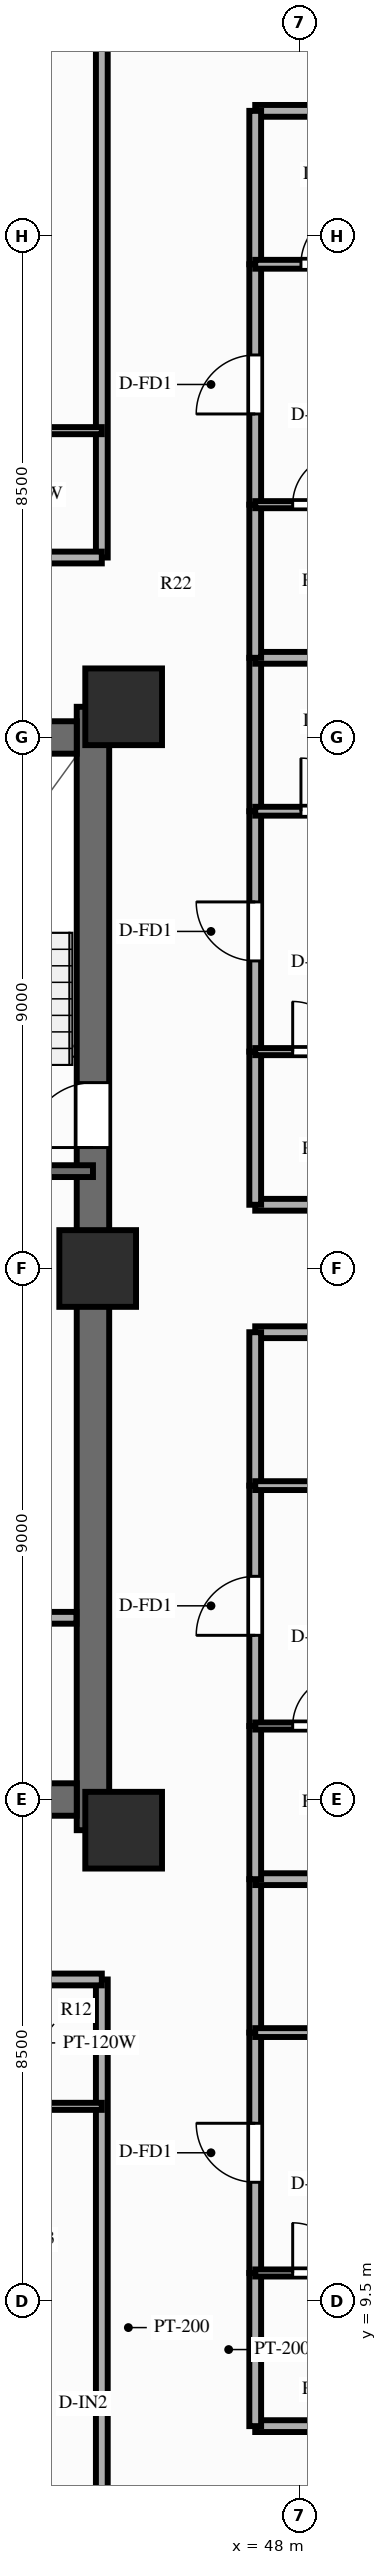
"""IFC4 building model, lengths in metres.
Left out: names, types, materials, properties, quantities, classifications, styles, units other than length and angle.
Written with IfcOpenShell. Run it as: python <this file> out.ifc"""

import sys

from ifc_helpers import new_model, si_unit, direction, frame, frame_2d, origin, origin_2d, place, context, subcontext, project, spatial, rectangle, extrude, source, transform, mapped, element, fill, save


model = new_model("IFC4")
c1 = context("Model", 3, precision=1e-05, world=origin(), true_north=direction((0.0, 1.0)))
c2 = subcontext(c1, "Body", "Model", "MODEL_VIEW")
j1 = project(units=[si_unit("LENGTHUNIT", "METRE"), si_unit("PLANEANGLEUNIT", "RADIAN")], contexts=[c1])
p1 = place(None, origin())
s1 = spatial("IfcSite", under=j1, at=p1, CompositionType="ELEMENT")
p2 = place(p1, origin())
s2 = spatial("IfcBuilding", under=s1, at=p2, CompositionType="ELEMENT")
p3 = place(p2, frame((0.0, 0.0, 107.85)))
s3 = spatial("IfcBuildingStorey", under=s2, at=p3, CompositionType="ELEMENT", Elevation=107.85)
p4 = place(p3, frame((44.5, 17.48, 0.0), z_axis=(0.0, 0.0, 1.0), x_axis=(0.0, 1.0, 0.0)))
e1 = element("IfcWall", 1, at=p4, inside=s3, PredefinedType="SHEAR", context=c2, shape_type="SweptSolid", body=[
    extrude(rectangle(XDim=19.04, YDim=0.55, at=frame_2d((9.52, 0.0))), origin(), (0.0, 0.0, 1.0), 3.0),
])
p5 = place(p4, frame((12.67, 0.0, 0.0), z_axis=(0.0, 0.0, 1.0), x_axis=(-1.0, 0.0, 0.0)))
e2 = element("IfcOpeningElement", 2, at=p5, cuts=e1, PredefinedType="OPENING", context=c2, shape_type="SweptSolid", body=[
    extrude(rectangle(XDim=1.1, YDim=2.15, at=frame_2d((0.55, 1.075))), frame((0.0, 0.287, 0.0), z_axis=(0.0, -1.0, 0.0), x_axis=(1.0, 0.0, 0.0)), (0.0, 0.0, 1.0), 0.574),
])
p6 = place(p3, frame((31.775, 18.0, 0.0), z_axis=(0.0, 0.0, 1.0), x_axis=(1.0, 0.0, 0.0)))
e3 = element("IfcWall", 3, at=p6, inside=s3, PredefinedType="SHEAR", context=c2, shape_type="SweptSolid", body=[
    extrude(rectangle(XDim=12.45, YDim=0.55, at=frame_2d((6.225, 0.0))), origin(), (0.0, 0.0, 1.0), 3.0),
])
p7 = place(p3, frame((31.775, 36.0, 0.0), z_axis=(0.0, 0.0, 1.0), x_axis=(1.0, 0.0, 0.0)))
e4 = element("IfcWall", 4, at=p7, inside=s3, PredefinedType="SHEAR", context=c2, shape_type="SweptSolid", body=[
    extrude(rectangle(XDim=12.45, YDim=0.55, at=frame_2d((6.225, 0.0))), origin(), (0.0, 0.0, 1.0), 3.0),
])
p8 = place(p7, frame((5.175, 0.0, 0.0), z_axis=(0.0, 0.0, 1.0), x_axis=(-1.0, 0.0, 0.0)))
e5 = element("IfcOpeningElement", 5, at=p8, cuts=e4, PredefinedType="OPENING", context=c2, shape_type="SweptSolid", body=[
    extrude(rectangle(XDim=1.4, YDim=2.15, at=frame_2d((0.7, 1.075))), frame((0.0, 0.287, 0.0), z_axis=(0.0, -1.0, 0.0), x_axis=(1.0, 0.0, 0.0)), (0.0, 0.0, 1.0), 0.574),
])
m1 = source(origin(), c2, "Body", "SweptSolid", [
    extrude(rectangle(XDim=1.3, YDim=1.3, at=origin_2d()), origin(), (0.0, 0.0, 1.0), 3.0),
])
for number, where, z_axis, x_axis in (
    (6, (45.02, 17.48, 0.0), (0.0, 0.0, 1.0), (1.0, 0.0, 0.0)),
    (7, (45.02, 36.52, 0.0), (0.0, 0.0, 1.0), (1.0, 0.0, 0.0)),
    (8, (44.58, 27.0, 0.0), (0.0, 0.0, 1.0), (1.0, 0.0, 0.0)),
):
    element("IfcColumn", number, at=place(p3, frame(where, z_axis=z_axis, x_axis=x_axis)), inside=s3, PredefinedType="COLUMN", context=c2, shape_type="MappedRepresentation", body=[
        mapped(m1, transform((0.0, 0.0, 0.0), scale=1.0)),
    ])
p9 = place(p3, frame((42.88, 21.08, 0.0), z_axis=(0.0, 0.0, 1.0), x_axis=(1.0, 0.0, 0.0)))
e9 = element("IfcWall", 9, at=p9, inside=s3, PredefinedType="PARTITIONING", context=c2, shape_type="SweptSolid", body=[
    extrude(rectangle(XDim=1.34, YDim=0.2, at=frame_2d((0.67, 0.0))), origin(), (0.0, 0.0, 1.0), 2.79),
])
p10 = place(p3, frame((40.57, 28.65, 0.0), z_axis=(0.0, 0.0, 1.0), x_axis=(1.0, 0.0, 0.0)))
e10 = element("IfcWall", 10, at=p10, inside=s3, PredefinedType="SOLIDWALL", context=c2, shape_type="SweptSolid", body=[
    extrude(rectangle(XDim=3.93, YDim=0.2, at=frame_2d((1.965, 0.0))), origin(), (0.0, 0.0, 1.0), 2.79),
])
p11 = place(p3, frame((44.65, 14.95, 0.0), z_axis=(0.0, 0.0, 1.0), x_axis=(0.0, -1.0, 0.0)))
e11 = element("IfcWall", 11, at=p11, inside=s3, PredefinedType="PARTITIONING", context=c2, shape_type="SweptSolid", body=[
    extrude(rectangle(XDim=11.8, YDim=0.2, at=frame_2d((5.9, 0.0))), origin(), (0.0, 0.0, 1.0), 2.34),
])
p12 = place(p3, frame((42.5, 14.95, 0.0), z_axis=(0.0, 0.0, 1.0), x_axis=(1.0, 0.0, 0.0)))
e12 = element("IfcWall", 12, at=p12, inside=s3, PredefinedType="PARTITIONING", context=c2, shape_type="SweptSolid", body=[
    extrude(rectangle(XDim=2.15, YDim=0.2, at=frame_2d((1.075, 0.0))), origin(), (0.0, 0.0, 1.0), 2.79),
])
p13 = place(p3, frame((42.5, 12.8, 0.0), z_axis=(0.0, 0.0, 1.0), x_axis=(1.0, 0.0, 0.0)))
e13 = element("IfcWall", 13, at=p13, inside=s3, PredefinedType="PARTITIONING", context=c2, shape_type="SweptSolid", body=[
    extrude(rectangle(XDim=2.15, YDim=0.12, at=frame_2d((1.075, 0.0))), origin(), (0.0, 0.0, 1.0), 2.79),
])
p14 = place(p3, frame((44.65, 39.05, 0.0), z_axis=(0.0, 0.0, 1.0), x_axis=(0.0, 1.0, 0.0)))
e14 = element("IfcWall", 14, at=p14, inside=s3, PredefinedType="PARTITIONING", context=c2, shape_type="SweptSolid", body=[
    extrude(rectangle(XDim=11.8, YDim=0.2, at=frame_2d((5.9, 0.0))), origin(), (0.0, 0.0, 1.0), 2.34),
])
p15 = place(p3, frame((42.085, 39.05, 0.0), z_axis=(0.0, 0.0, 1.0), x_axis=(1.0, 0.0, 0.0)))
e15 = element("IfcWall", 15, at=p15, inside=s3, PredefinedType="PARTITIONING", context=c2, shape_type="SweptSolid", body=[
    extrude(rectangle(XDim=2.564, YDim=0.2, at=frame_2d((1.282, 0.0))), origin(), (0.0, 0.0, 1.0), 2.79),
])
p16 = place(p3, frame((42.085, 41.2, 0.0), z_axis=(0.0, 0.0, 1.0), x_axis=(1.0, 0.0, 0.0)))
e16 = element("IfcWall", 16, at=p16, inside=s3, PredefinedType="PARTITIONING", context=c2, shape_type="SweptSolid", body=[
    extrude(rectangle(XDim=2.564, YDim=0.12, at=frame_2d((1.282, 0.0))), origin(), (0.0, 0.0, 1.0), 2.79),
])
for number, where, z_axis, x_axis in (
    (17, (47.25, 7.38, 0.0), (0.0, 0.0, 1.0), (1.0, 0.0, 0.0)),
    (18, (47.25, 25.92, 0.0), (0.0, 0.0, 1.0), (1.0, 0.0, 0.0)),
):
    element("IfcWall", number, at=place(p3, frame(where, z_axis=z_axis, x_axis=x_axis)), inside=s3, PredefinedType="PARTITIONING", context=c2, shape_type="SweptSolid", body=[
        extrude(rectangle(XDim=16.6, YDim=0.2, at=frame_2d((8.3, 0.0))), origin(), (0.0, 0.0, 1.0), 2.79),
    ])
p17 = place(p3, frame((47.25, 7.38, 0.0), z_axis=(0.0, 0.0, 1.0), x_axis=(0.0, 1.0, 0.0)))
e19 = element("IfcWall", 19, at=p17, inside=s3, PredefinedType="PARTITIONING", context=c2, shape_type="SweptSolid", body=[
    extrude(rectangle(XDim=2.596, YDim=0.2, at=frame_2d((1.298, 0.0))), origin(), (0.0, 0.0, 1.0), 2.79),
])
p18 = place(p3, frame((47.25, 9.976, 0.0), z_axis=(0.0, 0.0, 1.0), x_axis=(0.0, 1.0, 0.0)))
e20 = element("IfcWall", 20, at=p18, inside=s3, PredefinedType="PARTITIONING", context=c2, shape_type="SweptSolid", body=[
    extrude(rectangle(XDim=4.074, YDim=0.2, at=frame_2d((2.037, 0.0))), origin(), (0.0, 0.0, 1.0), 2.79),
])
p19 = place(p18, frame((1.537, 0.0, 0.0)))
e21 = element("IfcOpeningElement", 21, at=p19, cuts=e20, PredefinedType="OPENING", context=c2, shape_type="SweptSolid", body=[
    extrude(rectangle(XDim=1.0, YDim=2.15, at=frame_2d((0.5, 1.075))), frame((0.0, 0.112, 0.0), z_axis=(0.0, -1.0, 0.0), x_axis=(1.0, 0.0, 0.0)), (0.0, 0.0, 1.0), 0.224),
])
p20 = place(p3, frame((47.25, 14.05, 0.0), z_axis=(0.0, 0.0, 1.0), x_axis=(0.0, 1.0, 0.0)))
e22 = element("IfcWall", 22, at=p20, inside=s3, PredefinedType="PARTITIONING", context=c2, shape_type="SweptSolid", body=[
    extrude(rectangle(XDim=2.6, YDim=0.2, at=frame_2d((1.3, 0.0))), origin(), (0.0, 0.0, 1.0), 2.79),
])
p21 = place(p3, frame((47.25, 9.976, 0.0), z_axis=(0.0, 0.0, 1.0), x_axis=(1.0, 0.0, 0.0)))
e23 = element("IfcWall", 23, at=p21, inside=s3, PredefinedType="PARTITIONING", context=c2, shape_type="SweptSolid", body=[
    extrude(rectangle(XDim=2.12, YDim=0.12, at=frame_2d((1.06, 0.0))), origin(), (0.0, 0.0, 1.0), 2.79),
])
p22 = place(p21, frame((0.635, 0.0, 0.0)))
e24 = element("IfcOpeningElement", 24, at=p22, cuts=e23, PredefinedType="OPENING", context=c2, shape_type="SweptSolid", body=[
    extrude(rectangle(XDim=0.85, YDim=2.05, at=frame_2d((0.425, 1.025))), frame((0.0, 0.072, 0.0), z_axis=(0.0, -1.0, 0.0), x_axis=(1.0, 0.0, 0.0)), (0.0, 0.0, 1.0), 0.144),
])
p23 = place(p3, frame((47.25, 14.05, 0.0), z_axis=(0.0, 0.0, 1.0), x_axis=(1.0, 0.0, 0.0)))
e25 = element("IfcWall", 25, at=p23, inside=s3, PredefinedType="PARTITIONING", context=c2, shape_type="SweptSolid", body=[
    extrude(rectangle(XDim=2.93, YDim=0.15, at=frame_2d((1.465, 0.0))), origin(), (0.0, 0.0, 1.0), 2.79),
])
p24 = place(p23, frame((1.015, 0.0, 0.0)))
e26 = element("IfcOpeningElement", 26, at=p24, cuts=e25, PredefinedType="OPENING", context=c2, shape_type="SweptSolid", body=[
    extrude(rectangle(XDim=0.9, YDim=2.1, at=frame_2d((0.45, 1.05))), frame((0.0, 0.087, 0.0), z_axis=(0.0, -1.0, 0.0), x_axis=(1.0, 0.0, 0.0)), (0.0, 0.0, 1.0), 0.174),
])
p25 = place(p3, frame((47.25, 16.65, 0.0), z_axis=(0.0, 0.0, 1.0), x_axis=(1.0, 0.0, 0.0)))
e27 = element("IfcWall", 27, at=p25, inside=s3, PredefinedType="PARTITIONING", context=c2, shape_type="SweptSolid", body=[
    extrude(rectangle(XDim=16.6, YDim=0.2, at=frame_2d((8.3, 0.0))), origin(), (0.0, 0.0, 1.0), 2.79),
])
p26 = place(p3, frame((47.25, 16.65, 0.0), z_axis=(0.0, 0.0, 1.0), x_axis=(0.0, 1.0, 0.0)))
e28 = element("IfcWall", 28, at=p26, inside=s3, PredefinedType="PARTITIONING", context=c2, shape_type="SweptSolid", body=[
    extrude(rectangle(XDim=2.596, YDim=0.2, at=frame_2d((1.298, 0.0))), origin(), (0.0, 0.0, 1.0), 2.79),
])
p27 = place(p3, frame((47.25, 19.246, 0.0), z_axis=(0.0, 0.0, 1.0), x_axis=(0.0, 1.0, 0.0)))
e29 = element("IfcWall", 29, at=p27, inside=s3, PredefinedType="PARTITIONING", context=c2, shape_type="SweptSolid", body=[
    extrude(rectangle(XDim=4.074, YDim=0.2, at=frame_2d((2.037, 0.0))), origin(), (0.0, 0.0, 1.0), 2.79),
])
p28 = place(p27, frame((1.537, 0.0, 0.0)))
e30 = element("IfcOpeningElement", 30, at=p28, cuts=e29, PredefinedType="OPENING", context=c2, shape_type="SweptSolid", body=[
    extrude(rectangle(XDim=1.0, YDim=2.15, at=frame_2d((0.5, 1.075))), frame((0.0, 0.112, 0.0), z_axis=(0.0, -1.0, 0.0), x_axis=(1.0, 0.0, 0.0)), (0.0, 0.0, 1.0), 0.224),
])
p29 = place(p3, frame((47.25, 23.32, 0.0), z_axis=(0.0, 0.0, 1.0), x_axis=(0.0, 1.0, 0.0)))
e31 = element("IfcWall", 31, at=p29, inside=s3, PredefinedType="PARTITIONING", context=c2, shape_type="SweptSolid", body=[
    extrude(rectangle(XDim=2.6, YDim=0.2, at=frame_2d((1.3, 0.0))), origin(), (0.0, 0.0, 1.0), 2.79),
])
p30 = place(p3, frame((47.25, 19.246, 0.0), z_axis=(0.0, 0.0, 1.0), x_axis=(1.0, 0.0, 0.0)))
e32 = element("IfcWall", 32, at=p30, inside=s3, PredefinedType="PARTITIONING", context=c2, shape_type="SweptSolid", body=[
    extrude(rectangle(XDim=2.12, YDim=0.12, at=frame_2d((1.06, 0.0))), origin(), (0.0, 0.0, 1.0), 2.79),
])
p31 = place(p30, frame((0.635, 0.0, 0.0)))
e33 = element("IfcOpeningElement", 33, at=p31, cuts=e32, PredefinedType="OPENING", context=c2, shape_type="SweptSolid", body=[
    extrude(rectangle(XDim=0.85, YDim=2.05, at=frame_2d((0.425, 1.025))), frame((0.0, 0.072, 0.0), z_axis=(0.0, -1.0, 0.0), x_axis=(1.0, 0.0, 0.0)), (0.0, 0.0, 1.0), 0.144),
])
p32 = place(p3, frame((47.25, 23.32, 0.0), z_axis=(0.0, 0.0, 1.0), x_axis=(1.0, 0.0, 0.0)))
e34 = element("IfcWall", 34, at=p32, inside=s3, PredefinedType="PARTITIONING", context=c2, shape_type="SweptSolid", body=[
    extrude(rectangle(XDim=2.93, YDim=0.15, at=frame_2d((1.465, 0.0))), origin(), (0.0, 0.0, 1.0), 2.79),
])
p33 = place(p32, frame((1.015, 0.0, 0.0)))
e35 = element("IfcOpeningElement", 35, at=p33, cuts=e34, PredefinedType="OPENING", context=c2, shape_type="SweptSolid", body=[
    extrude(rectangle(XDim=0.9, YDim=2.1, at=frame_2d((0.45, 1.05))), frame((0.0, 0.087, 0.0), z_axis=(0.0, -1.0, 0.0), x_axis=(1.0, 0.0, 0.0)), (0.0, 0.0, 1.0), 0.174),
])
for number, where, z_axis, x_axis in (
    (36, (47.25, 28.08, 0.0), (0.0, 0.0, 1.0), (1.0, 0.0, 0.0)),
    (37, (47.25, 46.62, 0.0), (0.0, 0.0, 1.0), (1.0, 0.0, 0.0)),
):
    element("IfcWall", number, at=place(p3, frame(where, z_axis=z_axis, x_axis=x_axis)), inside=s3, PredefinedType="PARTITIONING", context=c2, shape_type="SweptSolid", body=[
        extrude(rectangle(XDim=16.6, YDim=0.2, at=frame_2d((8.3, 0.0))), origin(), (0.0, 0.0, 1.0), 2.79),
    ])
p34 = place(p3, frame((47.25, 28.08, 0.0), z_axis=(0.0, 0.0, 1.0), x_axis=(0.0, 1.0, 0.0)))
e38 = element("IfcWall", 38, at=p34, inside=s3, PredefinedType="PARTITIONING", context=c2, shape_type="SweptSolid", body=[
    extrude(rectangle(XDim=2.595, YDim=0.2, at=frame_2d((1.298, 0.0))), origin(), (0.0, 0.0, 1.0), 2.79),
])
p35 = place(p3, frame((47.25, 30.676, 0.0), z_axis=(0.0, 0.0, 1.0), x_axis=(0.0, 1.0, 0.0)))
e39 = element("IfcWall", 39, at=p35, inside=s3, PredefinedType="PARTITIONING", context=c2, shape_type="SweptSolid", body=[
    extrude(rectangle(XDim=4.074, YDim=0.2, at=frame_2d((2.037, 0.0))), origin(), (0.0, 0.0, 1.0), 2.79),
])
p36 = place(p35, frame((1.537, 0.0, 0.0)))
e40 = element("IfcOpeningElement", 40, at=p36, cuts=e39, PredefinedType="OPENING", context=c2, shape_type="SweptSolid", body=[
    extrude(rectangle(XDim=1.0, YDim=2.15, at=frame_2d((0.5, 1.075))), frame((0.0, 0.112, 0.0), z_axis=(0.0, -1.0, 0.0), x_axis=(1.0, 0.0, 0.0)), (0.0, 0.0, 1.0), 0.224),
])
p37 = place(p3, frame((47.25, 34.75, 0.0), z_axis=(0.0, 0.0, 1.0), x_axis=(0.0, 1.0, 0.0)))
e41 = element("IfcWall", 41, at=p37, inside=s3, PredefinedType="PARTITIONING", context=c2, shape_type="SweptSolid", body=[
    extrude(rectangle(XDim=2.6, YDim=0.2, at=frame_2d((1.3, 0.0))), origin(), (0.0, 0.0, 1.0), 2.79),
])
p38 = place(p3, frame((47.25, 30.676, 0.0), z_axis=(0.0, 0.0, 1.0), x_axis=(1.0, 0.0, 0.0)))
e42 = element("IfcWall", 42, at=p38, inside=s3, PredefinedType="PARTITIONING", context=c2, shape_type="SweptSolid", body=[
    extrude(rectangle(XDim=2.12, YDim=0.12, at=frame_2d((1.06, 0.0))), origin(), (0.0, 0.0, 1.0), 2.79),
])
p39 = place(p38, frame((0.635, 0.0, 0.0)))
e43 = element("IfcOpeningElement", 43, at=p39, cuts=e42, PredefinedType="OPENING", context=c2, shape_type="SweptSolid", body=[
    extrude(rectangle(XDim=0.85, YDim=2.05, at=frame_2d((0.425, 1.025))), frame((0.0, 0.072, 0.0), z_axis=(0.0, -1.0, 0.0), x_axis=(1.0, 0.0, 0.0)), (0.0, 0.0, 1.0), 0.144),
])
p40 = place(p3, frame((47.25, 34.75, 0.0), z_axis=(0.0, 0.0, 1.0), x_axis=(1.0, 0.0, 0.0)))
e44 = element("IfcWall", 44, at=p40, inside=s3, PredefinedType="PARTITIONING", context=c2, shape_type="SweptSolid", body=[
    extrude(rectangle(XDim=2.45, YDim=0.15, at=frame_2d((1.225, 0.0))), origin(), (0.0, 0.0, 1.0), 2.79),
])
p41 = place(p40, frame((0.775, 0.0, 0.0)))
e45 = element("IfcOpeningElement", 45, at=p41, cuts=e44, PredefinedType="OPENING", context=c2, shape_type="SweptSolid", body=[
    extrude(rectangle(XDim=0.9, YDim=2.1, at=frame_2d((0.45, 1.05))), frame((0.0, 0.087, 0.0), z_axis=(0.0, -1.0, 0.0), x_axis=(1.0, 0.0, 0.0)), (0.0, 0.0, 1.0), 0.174),
])
p42 = place(p3, frame((47.25, 37.35, 0.0), z_axis=(0.0, 0.0, 1.0), x_axis=(1.0, 0.0, 0.0)))
e46 = element("IfcWall", 46, at=p42, inside=s3, PredefinedType="PARTITIONING", context=c2, shape_type="SweptSolid", body=[
    extrude(rectangle(XDim=16.6, YDim=0.2, at=frame_2d((8.3, 0.0))), origin(), (0.0, 0.0, 1.0), 2.79),
])
p43 = place(p3, frame((47.25, 37.35, 0.0), z_axis=(0.0, 0.0, 1.0), x_axis=(0.0, 1.0, 0.0)))
e47 = element("IfcWall", 47, at=p43, inside=s3, PredefinedType="PARTITIONING", context=c2, shape_type="SweptSolid", body=[
    extrude(rectangle(XDim=2.595, YDim=0.2, at=frame_2d((1.298, 0.0))), origin(), (0.0, 0.0, 1.0), 2.79),
])
p44 = place(p3, frame((47.25, 39.946, 0.0), z_axis=(0.0, 0.0, 1.0), x_axis=(0.0, 1.0, 0.0)))
e48 = element("IfcWall", 48, at=p44, inside=s3, PredefinedType="PARTITIONING", context=c2, shape_type="SweptSolid", body=[
    extrude(rectangle(XDim=4.074, YDim=0.2, at=frame_2d((2.037, 0.0))), origin(), (0.0, 0.0, 1.0), 2.79),
])
p45 = place(p44, frame((1.537, 0.0, 0.0)))
e49 = element("IfcOpeningElement", 49, at=p45, cuts=e48, PredefinedType="OPENING", context=c2, shape_type="SweptSolid", body=[
    extrude(rectangle(XDim=1.0, YDim=2.15, at=frame_2d((0.5, 1.075))), frame((0.0, 0.112, 0.0), z_axis=(0.0, -1.0, 0.0), x_axis=(1.0, 0.0, 0.0)), (0.0, 0.0, 1.0), 0.224),
])
p46 = place(p3, frame((47.25, 44.02, 0.0), z_axis=(0.0, 0.0, 1.0), x_axis=(0.0, 1.0, 0.0)))
e50 = element("IfcWall", 50, at=p46, inside=s3, PredefinedType="PARTITIONING", context=c2, shape_type="SweptSolid", body=[
    extrude(rectangle(XDim=2.6, YDim=0.2, at=frame_2d((1.3, 0.0))), origin(), (0.0, 0.0, 1.0), 2.79),
])
p47 = place(p3, frame((47.25, 39.946, 0.0), z_axis=(0.0, 0.0, 1.0), x_axis=(1.0, 0.0, 0.0)))
e51 = element("IfcWall", 51, at=p47, inside=s3, PredefinedType="PARTITIONING", context=c2, shape_type="SweptSolid", body=[
    extrude(rectangle(XDim=2.12, YDim=0.12, at=frame_2d((1.06, 0.0))), origin(), (0.0, 0.0, 1.0), 2.79),
])
p48 = place(p47, frame((0.635, 0.0, 0.0)))
e52 = element("IfcOpeningElement", 52, at=p48, cuts=e51, PredefinedType="OPENING", context=c2, shape_type="SweptSolid", body=[
    extrude(rectangle(XDim=0.85, YDim=2.05, at=frame_2d((0.425, 1.025))), frame((0.0, 0.072, 0.0), z_axis=(0.0, -1.0, 0.0), x_axis=(1.0, 0.0, 0.0)), (0.0, 0.0, 1.0), 0.144),
])
p49 = place(p3, frame((47.25, 44.02, 0.0), z_axis=(0.0, 0.0, 1.0), x_axis=(1.0, 0.0, 0.0)))
e53 = element("IfcWall", 53, at=p49, inside=s3, PredefinedType="PARTITIONING", context=c2, shape_type="SweptSolid", body=[
    extrude(rectangle(XDim=2.45, YDim=0.15, at=frame_2d((1.225, 0.0))), origin(), (0.0, 0.0, 1.0), 2.79),
])
p50 = place(p49, frame((0.775, 0.0, 0.0)))
e54 = element("IfcOpeningElement", 54, at=p50, cuts=e53, PredefinedType="OPENING", context=c2, shape_type="SweptSolid", body=[
    extrude(rectangle(XDim=0.9, YDim=2.1, at=frame_2d((0.45, 1.05))), frame((0.0, 0.087, 0.0), z_axis=(0.0, -1.0, 0.0), x_axis=(1.0, 0.0, 0.0)), (0.0, 0.0, 1.0), 0.174),
])
m2 = source(origin(), c2, "Body", "SweptSolid", [
    extrude(rectangle(XDim=1.1, YDim=2.15, at=frame_2d((0.55, 1.075))), frame((0.0, 0.025, 0.0), z_axis=(0.0, -1.0, 0.0), x_axis=(1.0, 0.0, 0.0)), (0.0, 0.0, 1.0), 0.05),
])
p51 = place(p5, origin())
e55 = element("IfcDoor", 55, at=p51, inside=s3, OperationType="SINGLE_SWING_RIGHT", PredefinedType="DOOR", context=c2, shape_type="MappedRepresentation", body=[
    mapped(m2, transform((0.0, 0.0, 0.0), scale=1.0)),
])
fill(e2, e55)
m3 = source(origin(), c2, "Body", "SweptSolid", [
    extrude(rectangle(XDim=1.0, YDim=2.15, at=frame_2d((0.5, 1.075))), frame((0.0, 0.025, 0.0), z_axis=(0.0, -1.0, 0.0), x_axis=(1.0, 0.0, 0.0)), (0.0, 0.0, 1.0), 0.05),
])
p52 = place(p19, origin())
e56 = element("IfcDoor", 56, at=p52, inside=s3, OperationType="SINGLE_SWING_RIGHT", PredefinedType="DOOR", context=c2, shape_type="MappedRepresentation", body=[
    mapped(m3, transform((0.0, 0.0, 0.0), scale=1.0)),
])
fill(e21, e56)
m4 = source(origin(), c2, "Body", "SweptSolid", [
    extrude(rectangle(XDim=0.85, YDim=2.05, at=frame_2d((0.425, 1.025))), frame((0.0, 0.025, 0.0), z_axis=(0.0, -1.0, 0.0), x_axis=(1.0, 0.0, 0.0)), (0.0, 0.0, 1.0), 0.05),
])
p53 = place(p22, origin())
e57 = element("IfcDoor", 57, at=p53, inside=s3, OperationType="SINGLE_SWING_LEFT", PredefinedType="DOOR", context=c2, shape_type="MappedRepresentation", body=[
    mapped(m4, transform((0.0, 0.0, 0.0), scale=1.0)),
])
fill(e24, e57)
p54 = place(p28, origin())
e58 = element("IfcDoor", 58, at=p54, inside=s3, OperationType="SINGLE_SWING_LEFT", PredefinedType="DOOR", context=c2, shape_type="MappedRepresentation", body=[
    mapped(m3, transform((0.0, 0.0, 0.0), scale=1.0)),
])
fill(e30, e58)
p55 = place(p31, origin())
e59 = element("IfcDoor", 59, at=p55, inside=s3, OperationType="SINGLE_SWING_RIGHT", PredefinedType="DOOR", context=c2, shape_type="MappedRepresentation", body=[
    mapped(m4, transform((0.0, 0.0, 0.0), scale=1.0)),
])
fill(e33, e59)
p56 = place(p36, origin())
e60 = element("IfcDoor", 60, at=p56, inside=s3, OperationType="SINGLE_SWING_RIGHT", PredefinedType="DOOR", context=c2, shape_type="MappedRepresentation", body=[
    mapped(m3, transform((0.0, 0.0, 0.0), scale=1.0)),
])
fill(e40, e60)
p57 = place(p39, origin())
e61 = element("IfcDoor", 61, at=p57, inside=s3, OperationType="SINGLE_SWING_LEFT", PredefinedType="DOOR", context=c2, shape_type="MappedRepresentation", body=[
    mapped(m4, transform((0.0, 0.0, 0.0), scale=1.0)),
])
fill(e43, e61)
m5 = source(origin(), c2, "Body", "SweptSolid", [
    extrude(rectangle(XDim=0.9, YDim=2.1, at=frame_2d((0.45, 1.05))), frame((0.0, 0.025, 0.0), z_axis=(0.0, -1.0, 0.0), x_axis=(1.0, 0.0, 0.0)), (0.0, 0.0, 1.0), 0.05),
])
p58 = place(p41, origin())
e62 = element("IfcDoor", 62, at=p58, inside=s3, OperationType="SINGLE_SWING_LEFT", PredefinedType="DOOR", context=c2, shape_type="MappedRepresentation", body=[
    mapped(m5, transform((0.0, 0.0, 0.0), scale=1.0)),
])
fill(e45, e62)
p59 = place(p45, origin())
e63 = element("IfcDoor", 63, at=p59, inside=s3, OperationType="SINGLE_SWING_LEFT", PredefinedType="DOOR", context=c2, shape_type="MappedRepresentation", body=[
    mapped(m3, transform((0.0, 0.0, 0.0), scale=1.0)),
])
fill(e49, e63)
p60 = place(p48, origin())
e64 = element("IfcDoor", 64, at=p60, inside=s3, OperationType="SINGLE_SWING_RIGHT", PredefinedType="DOOR", context=c2, shape_type="MappedRepresentation", body=[
    mapped(m4, transform((0.0, 0.0, 0.0), scale=1.0)),
])
fill(e52, e64)
p61 = place(p50, origin())
e65 = element("IfcDoor", 65, at=p61, inside=s3, OperationType="SINGLE_SWING_RIGHT", PredefinedType="DOOR", context=c2, shape_type="MappedRepresentation", body=[
    mapped(m5, transform((0.0, 0.0, 0.0), scale=1.0)),
])
fill(e54, e65)
save(model, sys.argv[1])
